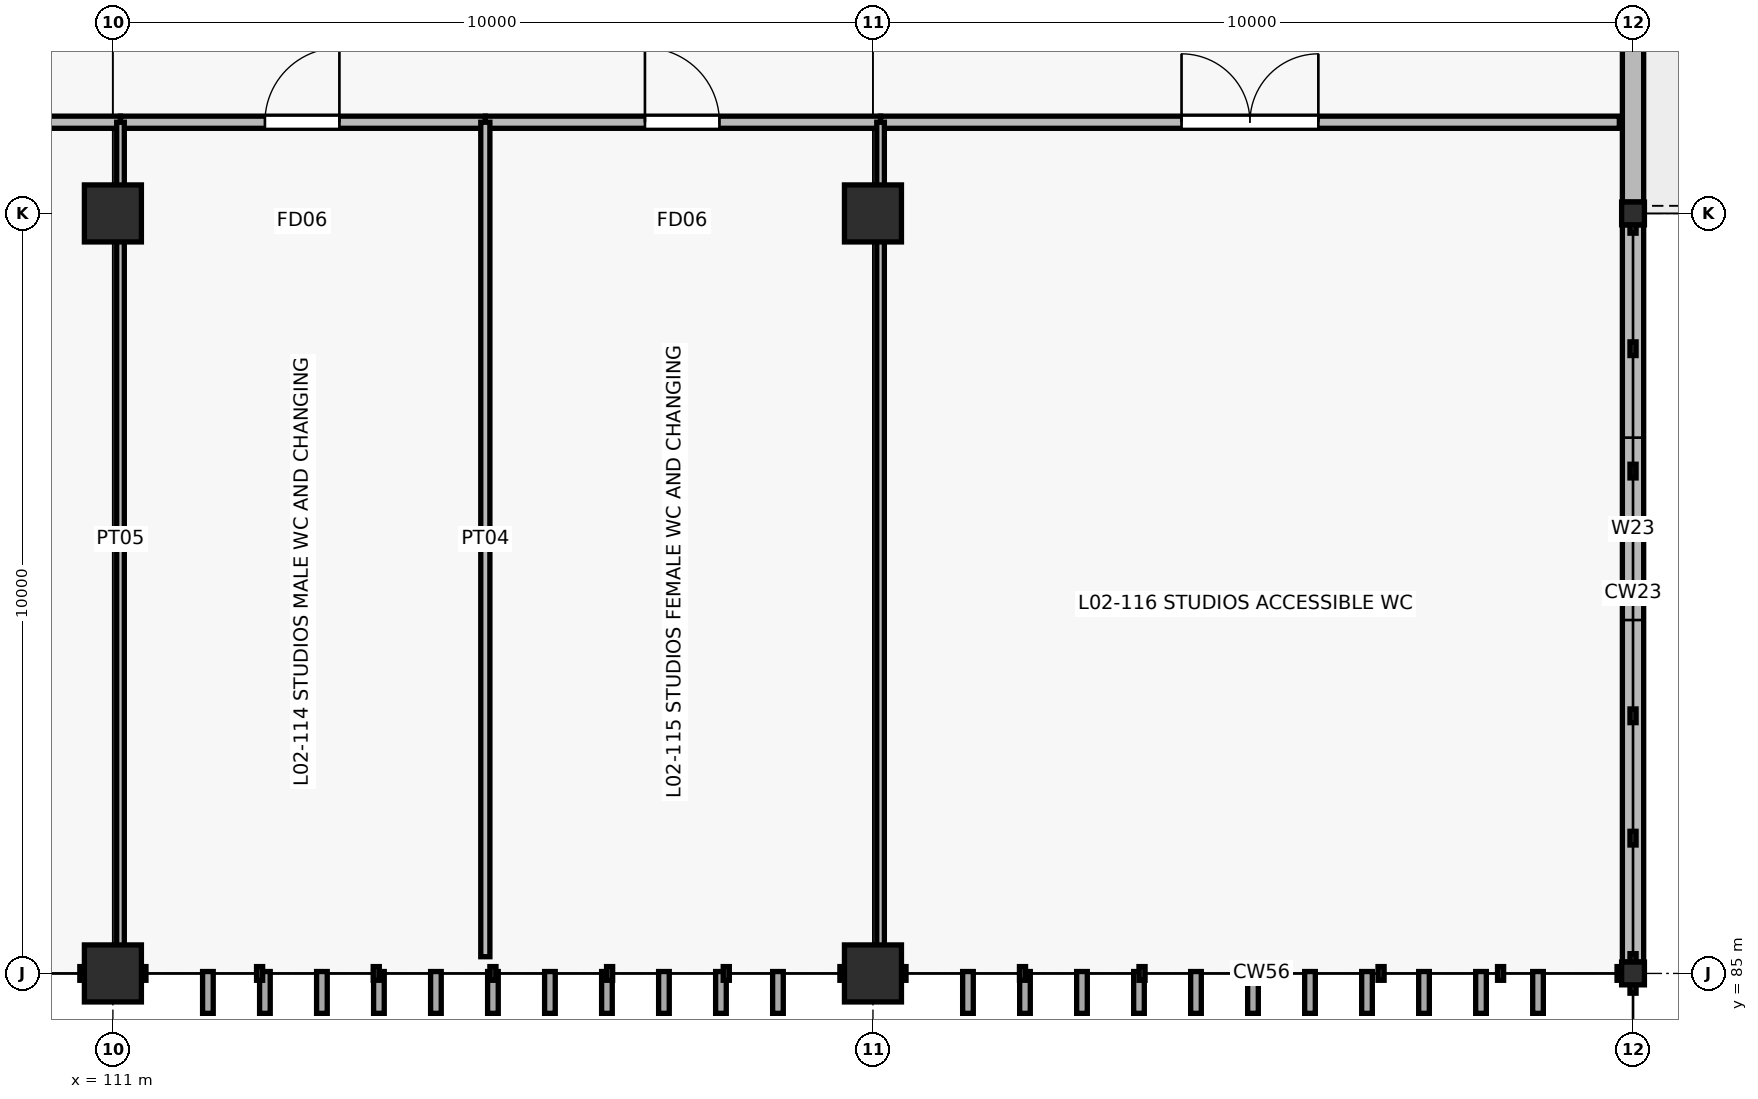
"""IFC4 building model, lengths in metres.
Left out: names, types, materials, properties, quantities, classifications, styles, units other than length and angle.
Written with IfcOpenShell. Run it as: python <this file> out.ifc"""

import sys

from ifc_helpers import new_model, si_unit, direction, frame, frame_2d, origin, origin_2d, place, context, subcontext, project, spatial, rectangle, i_section, extrude, element, fill, save


model = new_model("IFC4")
c1 = context("Model", 3, precision=1e-05, world=origin(), true_north=direction((0.0, 1.0)))
c2 = subcontext(c1, "Body", "Model", "MODEL_VIEW")
j1 = project(units=[si_unit("LENGTHUNIT", "METRE"), si_unit("PLANEANGLEUNIT", "RADIAN")], contexts=[c1])
p1 = place(None, origin())
s1 = spatial("IfcSite", under=j1, at=p1, CompositionType="ELEMENT")
p2 = place(p1, origin())
s2 = spatial("IfcBuilding", under=s1, at=p2, CompositionType="ELEMENT")
p3 = place(p2, frame((0.0, 0.0, 9.0)))
s3 = spatial("IfcBuildingStorey", under=s2, at=p3, CompositionType="ELEMENT", Elevation=9.0)
for number, where, z_axis, x_axis in (
    (1, (131.0, 85.0, 0.0), (0.0, 0.0, 1.0), (1.0, 0.0, 0.0)),
    (2, (131.0, 95.0, 0.0), (0.0, 0.0, 1.0), (1.0, 0.0, 0.0)),
):
    element("IfcColumn", number, at=place(p3, frame(where, z_axis=z_axis, x_axis=x_axis)), inside=s3, PredefinedType="COLUMN", context=c2, shape_type="SweptSolid", body=[
        extrude(i_section(OverallWidth=0.3, OverallDepth=0.3, WebThickness=0.011, FlangeThickness=0.019, at=origin_2d()), origin(), (0.0, 0.0, 1.0), 4.2),
    ])
for number, where, z_axis, x_axis in (
    (3, (111.0, 85.0, 0.0), (0.0, 0.0, 1.0), (1.0, 0.0, 0.0)),
    (4, (111.0, 95.0, 0.0), (0.0, 0.0, 1.0), (1.0, 0.0, 0.0)),
    (5, (121.0, 85.0, 0.0), (0.0, 0.0, 1.0), (1.0, 0.0, 0.0)),
    (6, (121.0, 95.0, 0.0), (0.0, 0.0, 1.0), (1.0, 0.0, 0.0)),
):
    element("IfcColumn", number, at=place(p3, frame(where, z_axis=z_axis, x_axis=x_axis)), inside=s3, PredefinedType="COLUMN", context=c2, shape_type="SweptSolid", body=[
        extrude(rectangle(XDim=0.75, YDim=0.75, at=origin_2d()), origin(), (0.0, 0.0, 1.0), 4.2),
    ])
p4 = place(p3, frame((131.0, 94.85, 0.0), z_axis=(0.0, 0.0, 1.0), x_axis=(0.0, -1.0, 0.0)))
e7 = element("IfcWall", 7, at=p4, inside=s3, PredefinedType="SOLIDWALL", context=c2, shape_type="SweptSolid", body=[
    extrude(rectangle(XDim=9.7, YDim=0.28, at=frame_2d((4.85, 0.0))), origin(), (0.0, 0.0, 1.0), 2.905),
])
p5 = place(p4, frame((2.8, 0.0, 0.9)))
e8 = element("IfcOpeningElement", 8, at=p5, cuts=e7, PredefinedType="OPENING", context=c2, shape_type="SweptSolid", body=[
    extrude(rectangle(XDim=2.4, YDim=1.1, at=frame_2d((1.2, 0.55))), frame((0.0, 0.15, 0.0), z_axis=(0.0, -1.0, 0.0), x_axis=(1.0, 0.0, 0.0)), (0.0, 0.0, 1.0), 0.3),
])
p6 = place(p3, frame((131.0, 104.625, 0.0), z_axis=(0.0, 0.0, 1.0), x_axis=(0.0, -1.0, 0.0)))
e9 = element("IfcWall", 9, at=p6, inside=s3, PredefinedType="SOLIDWALL", context=c2, shape_type="SweptSolid", body=[
    extrude(rectangle(XDim=9.475, YDim=0.28, at=frame_2d((4.738, 0.0))), origin(), (0.0, 0.0, 1.0), 2.905),
])
p7 = place(p6, frame((3.6, 0.0, 0.0)))
e10 = element("IfcOpeningElement", 10, at=p7, cuts=e9, PredefinedType="OPENING", context=c2, shape_type="SweptSolid", body=[
    extrude(rectangle(XDim=1.6, YDim=2.2, at=frame_2d((0.8, 1.1))), frame((0.0, 0.15, 0.0), z_axis=(0.0, -1.0, 0.0), x_axis=(1.0, 0.0, 0.0)), (0.0, 0.0, 1.0), 0.3),
])
p8 = place(p3, frame((91.1, 96.2, 0.0), z_axis=(0.0, 0.0, 1.0), x_axis=(1.0, 0.0, 0.0)))
e11 = element("IfcWall", 11, at=p8, inside=s3, PredefinedType="PARTITIONING", context=c2, shape_type="SweptSolid", body=[
    extrude(rectangle(XDim=20.0, YDim=0.16, at=frame_2d((10.0, 0.0))), origin(), (0.0, 0.0, 1.0), 2.905),
])
p9 = place(p8, frame((12.15, 0.0, 0.0)))
e12 = element("IfcOpeningElement", 12, at=p9, cuts=e11, PredefinedType="OPENING", context=c2, shape_type="SweptSolid", body=[
    extrude(rectangle(XDim=1.3, YDim=2.2, at=frame_2d((0.65, 1.1))), frame((0.0, 0.09, 0.0), z_axis=(0.0, -1.0, 0.0), x_axis=(1.0, 0.0, 0.0)), (0.0, 0.0, 1.0), 0.18),
])
p10 = place(p3, frame((111.1, 96.2, 0.0), z_axis=(0.0, 0.0, 1.0), x_axis=(1.0, 0.0, 0.0)))
e13 = element("IfcWall", 13, at=p10, inside=s3, PredefinedType="PARTITIONING", context=c2, shape_type="SweptSolid", body=[
    extrude(rectangle(XDim=4.8, YDim=0.16, at=frame_2d((2.4, 0.0))), origin(), (0.0, 0.0, 1.0), 2.905),
])
p11 = place(p10, frame((1.9, 0.0, 0.0)))
e14 = element("IfcOpeningElement", 14, at=p11, cuts=e13, PredefinedType="OPENING", context=c2, shape_type="SweptSolid", body=[
    extrude(rectangle(XDim=0.98, YDim=2.1, at=frame_2d((0.49, 1.05))), frame((0.0, 0.09, 0.0), z_axis=(0.0, -1.0, 0.0), x_axis=(1.0, 0.0, 0.0)), (0.0, 0.0, 1.0), 0.18),
])
p12 = place(p3, frame((111.1, 85.22, 0.0), z_axis=(0.0, 0.0, 1.0), x_axis=(0.0, 1.0, 0.0)))
e15 = element("IfcWall", 15, at=p12, inside=s3, PredefinedType="PARTITIONING", context=c2, shape_type="SweptSolid", body=[
    extrude(rectangle(XDim=10.98, YDim=0.1, at=frame_2d((5.49, 0.0))), origin(), (0.0, 0.0, 1.0), 2.905),
])
p13 = place(p3, frame((115.9, 96.2, 0.0), z_axis=(0.0, 0.0, 1.0), x_axis=(1.0, 0.0, 0.0)))
e16 = element("IfcWall", 16, at=p13, inside=s3, PredefinedType="PARTITIONING", context=c2, shape_type="SweptSolid", body=[
    extrude(rectangle(XDim=5.2, YDim=0.16, at=frame_2d((2.6, 0.0))), origin(), (0.0, 0.0, 1.0), 2.905),
])
p14 = place(p13, frame((2.1, 0.0, 0.0)))
e17 = element("IfcOpeningElement", 17, at=p14, cuts=e16, PredefinedType="OPENING", context=c2, shape_type="SweptSolid", body=[
    extrude(rectangle(XDim=0.98, YDim=2.1, at=frame_2d((0.49, 1.05))), frame((0.0, 0.09, 0.0), z_axis=(0.0, -1.0, 0.0), x_axis=(1.0, 0.0, 0.0)), (0.0, 0.0, 1.0), 0.18),
])
p15 = place(p3, frame((115.9, 85.22, 0.0), z_axis=(0.0, 0.0, 1.0), x_axis=(0.0, 1.0, 0.0)))
e18 = element("IfcWall", 18, at=p15, inside=s3, PredefinedType="PARTITIONING", context=c2, shape_type="SweptSolid", body=[
    extrude(rectangle(XDim=10.98, YDim=0.12, at=frame_2d((5.49, 0.0))), origin(), (0.0, 0.0, 1.0), 3.005),
])
p16 = place(p3, frame((121.1, 96.2, 0.0), z_axis=(0.0, 0.0, 1.0), x_axis=(1.0, 0.0, 0.0)))
e19 = element("IfcWall", 19, at=p16, inside=s3, PredefinedType="PARTITIONING", context=c2, shape_type="SweptSolid", body=[
    extrude(rectangle(XDim=9.72, YDim=0.16, at=frame_2d((4.86, 0.0))), origin(), (0.0, 0.0, 1.0), 2.905),
])
p17 = place(p16, frame((3.96, 0.0, 0.0)))
e20 = element("IfcOpeningElement", 20, at=p17, cuts=e19, PredefinedType="OPENING", context=c2, shape_type="SweptSolid", body=[
    extrude(rectangle(XDim=1.8, YDim=2.25, at=frame_2d((0.9, 1.125))), frame((0.0, 0.09, 0.0), z_axis=(0.0, -1.0, 0.0), x_axis=(1.0, 0.0, 0.0)), (0.0, 0.0, 1.0), 0.18),
])
p18 = place(p3, frame((121.1, 85.22, 0.0), z_axis=(0.0, 0.0, 1.0), x_axis=(0.0, 1.0, 0.0)))
e21 = element("IfcWall", 21, at=p18, inside=s3, PredefinedType="PARTITIONING", context=c2, shape_type="SweptSolid", body=[
    extrude(rectangle(XDim=10.98, YDim=0.1, at=frame_2d((5.49, 0.0))), origin(), (0.0, 0.0, 1.0), 2.905),
])
p19 = place(p5, origin())
e22 = element("IfcWindow", 22, at=p19, inside=s3, PartitioningType="DOUBLE_PANEL_VERTICAL", PredefinedType="WINDOW", context=c2, shape_type="SweptSolid", body=[
    extrude(rectangle(XDim=2.4, YDim=1.1, at=frame_2d((1.2, 0.55))), frame((0.0, 0.03, 0.0), z_axis=(0.0, -1.0, 0.0), x_axis=(1.0, 0.0, 0.0)), (0.0, 0.0, 1.0), 0.06),
])
fill(e8, e22)
p20 = place(p11, origin())
e23 = element("IfcDoor", 23, at=p20, inside=s3, OperationType="SINGLE_SWING_RIGHT", PredefinedType="DOOR", context=c2, shape_type="SweptSolid", body=[
    extrude(rectangle(XDim=0.98, YDim=2.1, at=frame_2d((0.49, 1.05))), frame((0.0, 0.025, 0.0), z_axis=(0.0, -1.0, 0.0), x_axis=(1.0, 0.0, 0.0)), (0.0, 0.0, 1.0), 0.05),
])
fill(e14, e23)
p21 = place(p14, origin())
e24 = element("IfcDoor", 24, at=p21, inside=s3, OperationType="SINGLE_SWING_LEFT", PredefinedType="DOOR", context=c2, shape_type="SweptSolid", body=[
    extrude(rectangle(XDim=0.98, YDim=2.1, at=frame_2d((0.49, 1.05))), frame((0.0, 0.025, 0.0), z_axis=(0.0, -1.0, 0.0), x_axis=(1.0, 0.0, 0.0)), (0.0, 0.0, 1.0), 0.05),
])
fill(e17, e24)
p22 = place(p17, origin())
e25 = element("IfcDoor", 25, at=p22, inside=s3, OperationType="DOUBLE_DOOR_SINGLE_SWING", PredefinedType="DOOR", context=c2, shape_type="SweptSolid", body=[
    extrude(rectangle(XDim=1.8, YDim=2.25, at=frame_2d((0.9, 1.125))), frame((0.0, 0.025, 0.0), z_axis=(0.0, -1.0, 0.0), x_axis=(1.0, 0.0, 0.0)), (0.0, 0.0, 1.0), 0.05),
])
fill(e20, e25)
save(model, sys.argv[1])
